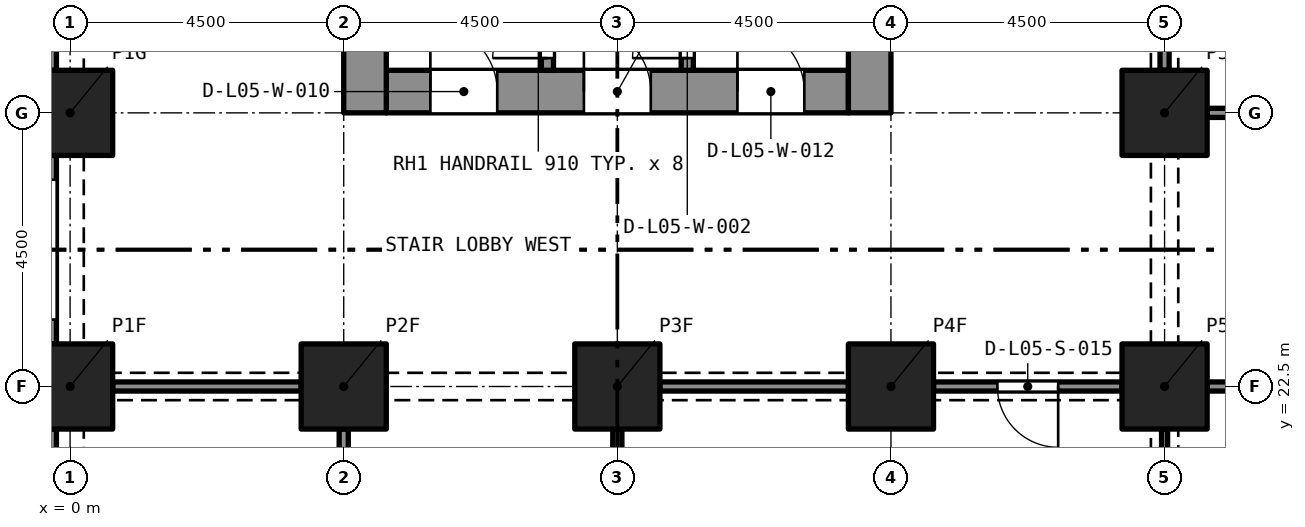
"""IFC4 building model, lengths in metres.
Left out: names, types, materials, properties, quantities, classifications, styles, units other than length and angle.
Written with IfcOpenShell. Run it as: python <this file> out.ifc"""

import sys

from ifc_helpers import new_model, si_unit, direction, frame, frame_2d, origin, origin_2d, place, context, subcontext, project, spatial, rectangle, extrude, element, fill, save


model = new_model("IFC4")
c1 = context("Model", 3, precision=1e-05, world=origin(), true_north=direction((0.0, 1.0)))
c2 = subcontext(c1, "Body", "Model", "MODEL_VIEW")
j1 = project(units=[si_unit("LENGTHUNIT", "METRE"), si_unit("PLANEANGLEUNIT", "RADIAN")], contexts=[c1])
p1 = place(None, origin())
s1 = spatial("IfcSite", under=j1, at=p1, CompositionType="ELEMENT")
p2 = place(p1, origin())
s2 = spatial("IfcBuilding", under=s1, at=p2, CompositionType="ELEMENT")
p3 = place(p2, frame((0.0, 0.0, 26.0)))
s3 = spatial("IfcBuildingStorey", under=s2, at=p3, CompositionType="ELEMENT", Elevation=26.0)
for number, where, z_axis, x_axis in (
    (1, (0.0, 22.5, 0.0), (0.0, 0.0, 1.0), (1.0, 0.0, 0.0)),
    (2, (4.5, 22.5, 0.0), (0.0, 0.0, 1.0), (1.0, 0.0, 0.0)),
    (3, (9.0, 22.5, 0.0), (0.0, 0.0, 1.0), (1.0, 0.0, 0.0)),
    (4, (13.5, 22.5, 0.0), (0.0, 0.0, 1.0), (1.0, 0.0, 0.0)),
    (5, (18.0, 22.5, 0.0), (0.0, 0.0, 1.0), (1.0, 0.0, 0.0)),
    (6, (0.0, 27.0, 0.0), (0.0, 0.0, 1.0), (1.0, 0.0, 0.0)),
    (7, (18.0, 27.0, 0.0), (0.0, 0.0, 1.0), (1.0, 0.0, 0.0)),
):
    element("IfcColumn", number, at=place(p3, frame(where, z_axis=z_axis, x_axis=x_axis)), inside=s3, PredefinedType="COLUMN", context=c2, shape_type="SweptSolid", body=[
        extrude(rectangle(XDim=1.4, YDim=1.4, at=origin_2d()), origin(), (0.0, 0.0, 1.0), 4.4),
    ])
p4 = place(p3, frame((5.2, 27.35, 0.0), z_axis=(0.0, 0.0, 1.0), x_axis=(1.0, 0.0, 0.0)))
e8 = element("IfcWall", 8, at=p4, inside=s3, PredefinedType="SOLIDWALL", context=c2, shape_type="SweptSolid", body=[
    extrude(rectangle(XDim=7.6, YDim=0.7, at=frame_2d((3.8, 0.0))), origin(), (0.0, 0.0, 1.0), 4.4),
])
p5 = place(p4, frame((0.725, 0.0, 0.0)))
e9 = element("IfcOpeningElement", 9, at=p5, cuts=e8, PredefinedType="OPENING", context=c2, shape_type="SweptSolid", body=[
    extrude(rectangle(XDim=1.1, YDim=2.1, at=frame_2d((0.55, 1.05))), frame((0.0, 0.36, 0.0), z_axis=(0.0, -1.0, 0.0), x_axis=(1.0, 0.0, 0.0)), (0.0, 0.0, 1.0), 0.72),
])
p6 = place(p4, frame((3.25, 0.0, 0.0)))
e10 = element("IfcOpeningElement", 10, at=p6, cuts=e8, PredefinedType="OPENING", context=c2, shape_type="SweptSolid", body=[
    extrude(rectangle(XDim=1.1, YDim=2.1, at=frame_2d((0.55, 1.05))), frame((0.0, 0.36, 0.0), z_axis=(0.0, -1.0, 0.0), x_axis=(1.0, 0.0, 0.0)), (0.0, 0.0, 1.0), 0.72),
])
p7 = place(p4, frame((5.775, 0.0, 0.0)))
e11 = element("IfcOpeningElement", 11, at=p7, cuts=e8, PredefinedType="OPENING", context=c2, shape_type="SweptSolid", body=[
    extrude(rectangle(XDim=1.1, YDim=2.1, at=frame_2d((0.55, 1.05))), frame((0.0, 0.36, 0.0), z_axis=(0.0, -1.0, 0.0), x_axis=(1.0, 0.0, 0.0)), (0.0, 0.0, 1.0), 0.72),
])
p8 = place(p3, frame((4.85, 27.0, 0.0), z_axis=(0.0, 0.0, 1.0), x_axis=(0.0, 1.0, 0.0)))
e12 = element("IfcWall", 12, at=p8, inside=s3, PredefinedType="SOLIDWALL", context=c2, shape_type="SweptSolid", body=[
    extrude(rectangle(XDim=13.5, YDim=0.7, at=frame_2d((6.75, 0.0))), origin(), (0.0, 0.0, 1.0), 4.4),
])
p9 = place(p8, frame((8.95, 0.0, 0.0)))
e13 = element("IfcOpeningElement", 13, at=p9, cuts=e12, PredefinedType="OPENING", context=c2, shape_type="SweptSolid", body=[
    extrude(rectangle(XDim=1.2, YDim=2.1, at=frame_2d((0.6, 1.05))), frame((0.0, 0.36, 0.0), z_axis=(0.0, -1.0, 0.0), x_axis=(1.0, 0.0, 0.0)), (0.0, 0.0, 1.0), 0.72),
])
p10 = place(p3, frame((13.15, 27.0, 0.0), z_axis=(0.0, 0.0, 1.0), x_axis=(0.0, 1.0, 0.0)))
e14 = element("IfcWall", 14, at=p10, inside=s3, PredefinedType="SOLIDWALL", context=c2, shape_type="SweptSolid", body=[
    extrude(rectangle(XDim=13.5, YDim=0.7, at=frame_2d((6.75, 0.0))), origin(), (0.0, 0.0, 1.0), 4.4),
])
p11 = place(p10, frame((11.1, 0.0, 0.0)))
e15 = element("IfcOpeningElement", 15, at=p11, cuts=e14, PredefinedType="OPENING", context=c2, shape_type="SweptSolid", body=[
    extrude(rectangle(XDim=1.1, YDim=2.1, at=frame_2d((0.55, 1.05))), frame((0.0, 0.36, 0.0), z_axis=(0.0, -1.0, 0.0), x_axis=(1.0, 0.0, 0.0)), (0.0, 0.0, 1.0), 0.72),
])
p12 = place(p10, frame((8.95, 0.0, 0.0)))
e16 = element("IfcOpeningElement", 16, at=p12, cuts=e14, PredefinedType="OPENING", context=c2, shape_type="SweptSolid", body=[
    extrude(rectangle(XDim=1.2, YDim=2.1, at=frame_2d((0.6, 1.05))), frame((0.0, 0.36, 0.0), z_axis=(0.0, -1.0, 0.0), x_axis=(1.0, 0.0, 0.0)), (0.0, 0.0, 1.0), 0.72),
])
p13 = place(p3, frame((-0.375, 27.7, 0.0), z_axis=(0.0, 0.0, 1.0), x_axis=(0.0, 1.0, 0.0)))
e17 = element("IfcWall", 17, at=p13, inside=s3, PredefinedType="SOLIDWALL", context=c2, shape_type="SweptSolid", body=[
    extrude(rectangle(XDim=3.1, YDim=0.3, at=frame_2d((1.55, 0.0))), origin(), (0.0, 0.0, 1.0), 4.4),
])
p14 = place(p13, frame((0.4, 0.0, 0.45)))
e18 = element("IfcOpeningElement", 18, at=p14, cuts=e17, PredefinedType="OPENING", context=c2, shape_type="SweptSolid", body=[
    extrude(rectangle(XDim=2.3, YDim=2.55, at=frame_2d((1.15, 1.275))), frame((0.0, 0.16, 0.0), z_axis=(0.0, -1.0, 0.0), x_axis=(1.0, 0.0, 0.0)), (0.0, 0.0, 1.0), 0.32),
])
p15 = place(p3, frame((-0.375, 23.2, 0.0), z_axis=(0.0, 0.0, 1.0), x_axis=(0.0, 1.0, 0.0)))
e19 = element("IfcWall", 19, at=p15, inside=s3, PredefinedType="SOLIDWALL", context=c2, shape_type="SweptSolid", body=[
    extrude(rectangle(XDim=3.1, YDim=0.3, at=frame_2d((1.55, 0.0))), origin(), (0.0, 0.0, 1.0), 4.4),
])
p16 = place(p15, frame((0.4, 0.0, 0.45)))
e20 = element("IfcOpeningElement", 20, at=p16, cuts=e19, PredefinedType="OPENING", context=c2, shape_type="SweptSolid", body=[
    extrude(rectangle(XDim=2.3, YDim=2.55, at=frame_2d((1.15, 1.275))), frame((0.0, 0.16, 0.0), z_axis=(0.0, -1.0, 0.0), x_axis=(1.0, 0.0, 0.0)), (0.0, 0.0, 1.0), 0.32),
])
p17 = place(p3, frame((-0.375, 18.7, 0.0), z_axis=(0.0, 0.0, 1.0), x_axis=(0.0, 1.0, 0.0)))
e21 = element("IfcWall", 21, at=p17, inside=s3, PredefinedType="SOLIDWALL", context=c2, shape_type="SweptSolid", body=[
    extrude(rectangle(XDim=3.1, YDim=0.3, at=frame_2d((1.55, 0.0))), origin(), (0.0, 0.0, 1.0), 4.4),
])
p18 = place(p17, frame((0.4, 0.0, 0.45)))
e22 = element("IfcOpeningElement", 22, at=p18, cuts=e21, PredefinedType="OPENING", context=c2, shape_type="SweptSolid", body=[
    extrude(rectangle(XDim=2.3, YDim=2.55, at=frame_2d((1.15, 1.275))), frame((0.0, 0.16, 0.0), z_axis=(0.0, -1.0, 0.0), x_axis=(1.0, 0.0, 0.0)), (0.0, 0.0, 1.0), 0.32),
])
p19 = place(p3, frame((7.85, 27.7, 0.0), z_axis=(0.0, 0.0, 1.0), x_axis=(0.0, 1.0, 0.0)))
e23 = element("IfcWall", 23, at=p19, inside=s3, PredefinedType="SOLIDWALL", context=c2, shape_type="SweptSolid", body=[
    extrude(rectangle(XDim=5.4, YDim=0.2, at=frame_2d((2.7, 0.0))), origin(), (0.0, 0.0, 1.0), 4.1),
])
p20 = place(p19, frame((0.2, 0.0, 0.0)))
e24 = element("IfcOpeningElement", 24, at=p20, cuts=e23, PredefinedType="OPENING", context=c2, shape_type="SweptSolid", body=[
    extrude(rectangle(XDim=0.9, YDim=2.1, at=frame_2d((0.45, 1.05))), frame((0.0, 0.11, 0.0), z_axis=(0.0, -1.0, 0.0), x_axis=(1.0, 0.0, 0.0)), (0.0, 0.0, 1.0), 0.22),
])
p21 = place(p3, frame((10.15, 27.7, 0.0), z_axis=(0.0, 0.0, 1.0), x_axis=(0.0, 1.0, 0.0)))
e25 = element("IfcWall", 25, at=p21, inside=s3, PredefinedType="SOLIDWALL", context=c2, shape_type="SweptSolid", body=[
    extrude(rectangle(XDim=5.4, YDim=0.2, at=frame_2d((2.7, 0.0))), origin(), (0.0, 0.0, 1.0), 4.1),
])
p22 = place(p21, frame((0.2, 0.0, 0.0)))
e26 = element("IfcOpeningElement", 26, at=p22, cuts=e25, PredefinedType="OPENING", context=c2, shape_type="SweptSolid", body=[
    extrude(rectangle(XDim=0.9, YDim=2.1, at=frame_2d((0.45, 1.05))), frame((0.0, 0.11, 0.0), z_axis=(0.0, -1.0, 0.0), x_axis=(1.0, 0.0, 0.0)), (0.0, 0.0, 1.0), 0.22),
])
p23 = place(p3, frame((18.7, 27.0, 0.0), z_axis=(0.0, 0.0, 1.0), x_axis=(1.0, 0.0, 0.0)))
e27 = element("IfcWall", 27, at=p23, inside=s3, PredefinedType="PARTITIONING", context=c2, shape_type="SweptSolid", body=[
    extrude(rectangle(XDim=12.1, YDim=0.15, at=frame_2d((6.05, 0.0))), origin(), (0.0, 0.0, 1.0), 3.95),
])
p24 = place(p23, frame((5.45, 0.0, 0.0)))
e28 = element("IfcOpeningElement", 28, at=p24, cuts=e27, PredefinedType="OPENING", context=c2, shape_type="SweptSolid", body=[
    extrude(rectangle(XDim=1.2, YDim=2.1, at=frame_2d((0.6, 1.05))), frame((0.0, 0.085, 0.0), z_axis=(0.0, -1.0, 0.0), x_axis=(1.0, 0.0, 0.0)), (0.0, 0.0, 1.0), 0.17),
])
p25 = place(p3, frame((30.8, 22.5, 0.0), z_axis=(0.0, 0.0, 1.0), x_axis=(-1.0, 0.0, 0.0)))
e29 = element("IfcWall", 29, at=p25, inside=s3, PredefinedType="PARTITIONING", context=c2, shape_type="SweptSolid", body=[
    extrude(rectangle(XDim=12.1, YDim=0.15, at=frame_2d((6.05, 0.0))), origin(), (0.0, 0.0, 1.0), 3.95),
])
p26 = place(p25, frame((5.55, 0.0, 0.0)))
e30 = element("IfcOpeningElement", 30, at=p26, cuts=e29, PredefinedType="OPENING", context=c2, shape_type="SweptSolid", body=[
    extrude(rectangle(XDim=1.0, YDim=2.1, at=frame_2d((0.5, 1.05))), frame((0.0, 0.085, 0.0), z_axis=(0.0, -1.0, 0.0), x_axis=(1.0, 0.0, 0.0)), (0.0, 0.0, 1.0), 0.17),
])
p27 = place(p3, frame((18.0, 27.7, 0.0), z_axis=(0.0, 0.0, 1.0), x_axis=(0.0, 1.0, 0.0)))
e31 = element("IfcWall", 31, at=p27, inside=s3, PredefinedType="PARTITIONING", context=c2, shape_type="SweptSolid", body=[
    extrude(rectangle(XDim=3.1, YDim=0.15, at=frame_2d((1.55, 0.0))), origin(), (0.0, 0.0, 1.0), 3.58),
])
p28 = place(p3, frame((18.0, 18.7, 0.0), z_axis=(0.0, 0.0, 1.0), x_axis=(0.0, 1.0, 0.0)))
e32 = element("IfcWall", 32, at=p28, inside=s3, PredefinedType="PARTITIONING", context=c2, shape_type="SweptSolid", body=[
    extrude(rectangle(XDim=3.1, YDim=0.1, at=frame_2d((1.55, 0.0))), origin(), (0.0, 0.0, 1.0), 3.58),
])
p29 = place(p3, frame((17.3, 22.5, 0.0), z_axis=(0.0, 0.0, 1.0), x_axis=(-1.0, 0.0, 0.0)))
e33 = element("IfcWall", 33, at=p29, inside=s3, PredefinedType="PARTITIONING", context=c2, shape_type="SweptSolid", body=[
    extrude(rectangle(XDim=3.1, YDim=0.15, at=frame_2d((1.55, 0.0))), origin(), (0.0, 0.0, 1.0), 3.58),
])
p30 = place(p29, frame((1.05, 0.0, 0.0)))
e34 = element("IfcOpeningElement", 34, at=p30, cuts=e33, PredefinedType="OPENING", context=c2, shape_type="SweptSolid", body=[
    extrude(rectangle(XDim=1.0, YDim=2.1, at=frame_2d((0.5, 1.05))), frame((0.0, 0.085, 0.0), z_axis=(0.0, -1.0, 0.0), x_axis=(1.0, 0.0, 0.0)), (0.0, 0.0, 1.0), 0.17),
])
for number, where, z_axis, x_axis in (
    (35, (9.7, 22.5, 0.0), (0.0, 0.0, 1.0), (1.0, 0.0, 0.0)),
    (36, (0.7, 22.5, 0.0), (0.0, 0.0, 1.0), (1.0, 0.0, 0.0)),
):
    element("IfcWall", number, at=place(p3, frame(where, z_axis=z_axis, x_axis=x_axis)), inside=s3, PredefinedType="PARTITIONING", context=c2, shape_type="SweptSolid", body=[
        extrude(rectangle(XDim=3.1, YDim=0.15, at=frame_2d((1.55, 0.0))), origin(), (0.0, 0.0, 1.0), 3.58),
    ])
p31 = place(p3, frame((9.0, 21.8, 0.0), z_axis=(0.0, 0.0, 1.0), x_axis=(0.0, -1.0, 0.0)))
e37 = element("IfcWall", 37, at=p31, inside=s3, PredefinedType="PARTITIONING", context=c2, shape_type="SweptSolid", body=[
    extrude(rectangle(XDim=8.3, YDim=0.15, at=frame_2d((4.15, 0.0))), origin(), (0.0, 0.0, 1.0), 4.1),
])
p32 = place(p31, frame((3.55, 0.0, 0.0)))
e38 = element("IfcOpeningElement", 38, at=p32, cuts=e37, PredefinedType="OPENING", context=c2, shape_type="SweptSolid", body=[
    extrude(rectangle(XDim=1.2, YDim=2.1, at=frame_2d((0.6, 1.05))), frame((0.0, 0.085, 0.0), z_axis=(0.0, -1.0, 0.0), x_axis=(1.0, 0.0, 0.0)), (0.0, 0.0, 1.0), 0.17),
])
p33 = place(p3, frame((4.5, 13.5, 0.0), z_axis=(0.0, 0.0, 1.0), x_axis=(0.0, 1.0, 0.0)))
e39 = element("IfcWall", 39, at=p33, inside=s3, PredefinedType="PARTITIONING", context=c2, shape_type="SweptSolid", body=[
    extrude(rectangle(XDim=8.3, YDim=0.15, at=frame_2d((4.15, 0.0))), origin(), (0.0, 0.0, 1.0), 4.1),
])
p34 = place(p33, frame((3.75, 0.0, 0.0)))
e40 = element("IfcOpeningElement", 40, at=p34, cuts=e39, PredefinedType="OPENING", context=c2, shape_type="SweptSolid", body=[
    extrude(rectangle(XDim=0.8, YDim=2.1, at=frame_2d((0.4, 1.05))), frame((0.0, 0.085, 0.0), z_axis=(0.0, -1.0, 0.0), x_axis=(1.0, 0.0, 0.0)), (0.0, 0.0, 1.0), 0.17),
])
p35 = place(p20, origin())
e41 = element("IfcDoor", 41, at=p35, inside=s3, OperationType="SINGLE_SWING_LEFT", PredefinedType="DOOR", context=c2, shape_type="SweptSolid", body=[
    extrude(rectangle(XDim=0.9, YDim=2.1, at=frame_2d((0.45, 1.05))), frame((0.0, 0.025, 0.0), z_axis=(0.0, -1.0, 0.0), x_axis=(1.0, 0.0, 0.0)), (0.0, 0.0, 1.0), 0.05),
])
fill(e24, e41)
p36 = place(p22, origin())
e42 = element("IfcDoor", 42, at=p36, inside=s3, OperationType="SINGLE_SWING_LEFT", PredefinedType="DOOR", context=c2, shape_type="SweptSolid", body=[
    extrude(rectangle(XDim=0.9, YDim=2.1, at=frame_2d((0.45, 1.05))), frame((0.0, 0.025, 0.0), z_axis=(0.0, -1.0, 0.0), x_axis=(1.0, 0.0, 0.0)), (0.0, 0.0, 1.0), 0.05),
])
fill(e26, e42)
p37 = place(p5, origin())
e43 = element("IfcDoor", 43, at=p37, inside=s3, OperationType="SINGLE_SWING_LEFT", PredefinedType="DOOR", context=c2, shape_type="SweptSolid", body=[
    extrude(rectangle(XDim=1.1, YDim=2.1, at=frame_2d((0.55, 1.05))), frame((0.0, 0.025, 0.0), z_axis=(0.0, -1.0, 0.0), x_axis=(1.0, 0.0, 0.0)), (0.0, 0.0, 1.0), 0.05),
])
fill(e9, e43)
p38 = place(p6, origin())
e44 = element("IfcDoor", 44, at=p38, inside=s3, OperationType="SINGLE_SWING_LEFT", PredefinedType="DOOR", context=c2, shape_type="SweptSolid", body=[
    extrude(rectangle(XDim=1.1, YDim=2.1, at=frame_2d((0.55, 1.05))), frame((0.0, 0.025, 0.0), z_axis=(0.0, -1.0, 0.0), x_axis=(1.0, 0.0, 0.0)), (0.0, 0.0, 1.0), 0.05),
])
fill(e10, e44)
p39 = place(p7, origin())
e45 = element("IfcDoor", 45, at=p39, inside=s3, OperationType="SINGLE_SWING_LEFT", PredefinedType="DOOR", context=c2, shape_type="SweptSolid", body=[
    extrude(rectangle(XDim=1.1, YDim=2.1, at=frame_2d((0.55, 1.05))), frame((0.0, 0.025, 0.0), z_axis=(0.0, -1.0, 0.0), x_axis=(1.0, 0.0, 0.0)), (0.0, 0.0, 1.0), 0.05),
])
fill(e11, e45)
p40 = place(p30, origin())
e46 = element("IfcDoor", 46, at=p40, inside=s3, OperationType="SINGLE_SWING_RIGHT", PredefinedType="DOOR", context=c2, shape_type="SweptSolid", body=[
    extrude(rectangle(XDim=1.0, YDim=2.1, at=frame_2d((0.5, 1.05))), frame((0.0, 0.025, 0.0), z_axis=(0.0, -1.0, 0.0), x_axis=(1.0, 0.0, 0.0)), (0.0, 0.0, 1.0), 0.05),
])
fill(e34, e46)
save(model, sys.argv[1])
